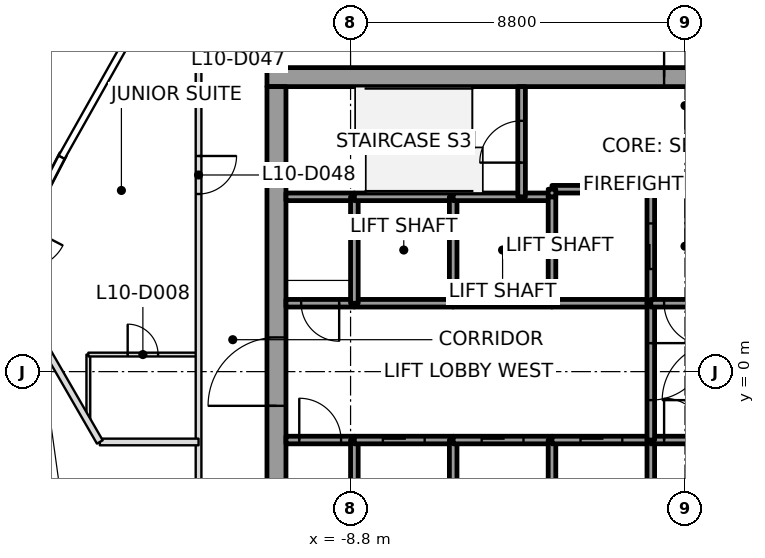
"""IFC4 building model, lengths in metres.
Left out: names, types, materials, properties, quantities, classifications, styles, units other than length and angle.
Written with IfcOpenShell. Run it as: python <this file> out.ifc"""

import sys

from ifc_helpers import new_model, si_unit, direction, frame, frame_2d, origin, place, context, subcontext, project, spatial, rectangle, extrude, element, fill, save


model = new_model("IFC4")
c1 = context("Model", 3, precision=1e-05, world=origin(), true_north=direction((0.0, 1.0)))
c2 = subcontext(c1, "Body", "Model", "MODEL_VIEW")
j1 = project(units=[si_unit("LENGTHUNIT", "METRE"), si_unit("PLANEANGLEUNIT", "RADIAN")], contexts=[c1])
p1 = place(None, origin())
s1 = spatial("IfcSite", under=j1, at=p1, CompositionType="ELEMENT")
p2 = place(p1, origin())
s2 = spatial("IfcBuilding", under=s1, at=p2, CompositionType="ELEMENT")
p3 = place(p2, frame((0.0, 0.0, 59.1)))
s3 = spatial("IfcBuildingStorey", under=s2, at=p3, CompositionType="ELEMENT", Elevation=59.1)
p4 = place(p3, frame((-11.0, 7.75, 0.0), z_axis=(0.0, 0.0, 1.0), x_axis=(1.0, 0.0, 0.0)))
e1 = element("IfcWall", 1, at=p4, inside=s3, PredefinedType="SHEAR", context=c2, shape_type="SweptSolid", body=[
    extrude(rectangle(XDim=22.0, YDim=0.5, at=frame_2d((11.0, 0.0))), origin(), (0.0, 0.0, 1.0), 3.7),
])
p5 = place(p4, frame((10.45, 0.0, 0.0)))
e2 = element("IfcOpeningElement", 2, at=p5, cuts=e1, PredefinedType="OPENING", context=c2, shape_type="SweptSolid", body=[
    extrude(rectangle(XDim=1.1, YDim=2.1, at=frame_2d((0.55, 1.05))), frame((0.0, 0.25, 0.0), z_axis=(0.0, -1.0, 0.0), x_axis=(1.0, 0.0, 0.0)), (0.0, 0.0, 1.0), 0.5),
])
p6 = place(p3, frame((-10.75, -7.5, 0.0), z_axis=(0.0, 0.0, 1.0), x_axis=(0.0, 1.0, 0.0)))
e3 = element("IfcWall", 3, at=p6, inside=s3, PredefinedType="SHEAR", context=c2, shape_type="SweptSolid", body=[
    extrude(rectangle(XDim=15.0, YDim=0.5, at=frame_2d((7.5, 0.0))), origin(), (0.0, 0.0, 1.0), 3.7),
])
p7 = place(p6, frame((6.6, 0.0, 0.0)))
e4 = element("IfcOpeningElement", 4, at=p7, cuts=e3, PredefinedType="OPENING", context=c2, shape_type="SweptSolid", body=[
    extrude(rectangle(XDim=1.8, YDim=2.1, at=frame_2d((0.9, 1.05))), frame((0.0, 0.25, 0.0), z_axis=(0.0, -1.0, 0.0), x_axis=(1.0, 0.0, 0.0)), (0.0, 0.0, 1.0), 0.5),
])
p8 = place(p3, frame((-16.363, 5.72, 0.0), z_axis=(0.0, 0.0, 1.0), x_axis=(-0.46026588587, -0.887781118466, 0.0)))
e5 = element("IfcWall", 5, at=p8, inside=s3, PredefinedType="SOLIDWALL", context=c2, shape_type="SweptSolid", body=[
    extrude(rectangle(XDim=5.837, YDim=0.2, at=frame_2d((2.918, 0.0))), origin(), (0.0, 0.0, 1.0), 3.017),
])
p9 = place(p8, frame((2.134, 0.0, 0.0)))
e6 = element("IfcOpeningElement", 6, at=p9, cuts=e5, PredefinedType="OPENING", context=c2, shape_type="SweptSolid", body=[
    extrude(rectangle(XDim=1.1, YDim=2.1, at=frame_2d((0.55, 1.05))), frame((0.0, 0.1, 0.0), z_axis=(0.0, -1.0, 0.0), x_axis=(1.0, 0.0, 0.0)), (0.0, 0.0, 1.0), 0.2),
])
p10 = place(p3, frame((-10.5, -1.8, 0.0), z_axis=(0.0, 0.0, 1.0), x_axis=(1.0, 0.0, 0.0)))
e7 = element("IfcWall", 7, at=p10, inside=s3, PredefinedType="SOLIDWALL", context=c2, shape_type="SweptSolid", body=[
    extrude(rectangle(XDim=1.8, YDim=0.2, at=frame_2d((0.9, 0.0))), origin(), (0.0, 0.0, 1.0), 3.55),
])
p11 = place(p10, frame((0.35, 0.0, 0.0)))
e8 = element("IfcOpeningElement", 8, at=p11, cuts=e7, PredefinedType="OPENING", context=c2, shape_type="SweptSolid", body=[
    extrude(rectangle(XDim=1.1, YDim=2.1, at=frame_2d((0.55, 1.05))), frame((0.0, 0.1, 0.0), z_axis=(0.0, -1.0, 0.0), x_axis=(1.0, 0.0, 0.0)), (0.0, 0.0, 1.0), 0.2),
])
p12 = place(p3, frame((-8.7, 1.8, 0.0), z_axis=(0.0, 0.0, 1.0), x_axis=(-1.0, 0.0, 0.0)))
e9 = element("IfcWall", 9, at=p12, inside=s3, PredefinedType="SOLIDWALL", context=c2, shape_type="SweptSolid", body=[
    extrude(rectangle(XDim=1.8, YDim=0.2, at=frame_2d((0.9, 0.0))), origin(), (0.0, 0.0, 1.0), 3.55),
])
p13 = place(p12, frame((0.4, 0.0, 0.0)))
e10 = element("IfcOpeningElement", 10, at=p13, cuts=e9, PredefinedType="OPENING", context=c2, shape_type="SweptSolid", body=[
    extrude(rectangle(XDim=1.0, YDim=2.1, at=frame_2d((0.5, 1.05))), frame((0.0, 0.1, 0.0), z_axis=(0.0, -1.0, 0.0), x_axis=(1.0, 0.0, 0.0)), (0.0, 0.0, 1.0), 0.2),
])
p14 = place(p3, frame((-8.7, 4.6, 0.0), z_axis=(0.0, 0.0, 1.0), x_axis=(-1.0, 0.0, 0.0)))
e11 = element("IfcWall", 11, at=p14, inside=s3, PredefinedType="SOLIDWALL", context=c2, shape_type="SweptSolid", body=[
    extrude(rectangle(XDim=1.8, YDim=0.2, at=frame_2d((0.9, 0.0))), origin(), (0.0, 0.0, 1.0), 3.55),
])
p15 = place(p3, frame((-8.7, -4.6, 0.0), z_axis=(0.0, 0.0, 1.0), x_axis=(0.0, 1.0, 0.0)))
e12 = element("IfcWall", 12, at=p15, inside=s3, PredefinedType="SOLIDWALL", context=c2, shape_type="SweptSolid", body=[
    extrude(rectangle(XDim=2.8, YDim=0.2, at=frame_2d((1.4, 0.0))), origin(), (0.0, 0.0, 1.0), 3.55),
])
p16 = place(p3, frame((-8.7, -1.8, 0.0), z_axis=(0.0, 0.0, 1.0), x_axis=(1.0, 0.0, 0.0)))
e13 = element("IfcWall", 13, at=p16, inside=s3, PredefinedType="SOLIDWALL", context=c2, shape_type="SweptSolid", body=[
    extrude(rectangle(XDim=2.6, YDim=0.2, at=frame_2d((1.3, 0.0))), origin(), (0.0, 0.0, 1.0), 3.55),
])
p17 = place(p16, frame((0.75, 0.0, 0.0)))
e14 = element("IfcOpeningElement", 14, at=p17, cuts=e13, PredefinedType="OPENING", context=c2, shape_type="SweptSolid", body=[
    extrude(rectangle(XDim=1.1, YDim=2.1, at=frame_2d((0.55, 1.05))), frame((0.0, 0.1, 0.0), z_axis=(0.0, -1.0, 0.0), x_axis=(1.0, 0.0, 0.0)), (0.0, 0.0, 1.0), 0.2),
])
p18 = place(p3, frame((-6.1, 1.8, 0.0), z_axis=(0.0, 0.0, 1.0), x_axis=(-1.0, 0.0, 0.0)))
e15 = element("IfcWall", 15, at=p18, inside=s3, PredefinedType="SOLIDWALL", context=c2, shape_type="SweptSolid", body=[
    extrude(rectangle(XDim=2.6, YDim=0.2, at=frame_2d((1.3, 0.0))), origin(), (0.0, 0.0, 1.0), 3.55),
])
p19 = place(p3, frame((-8.7, 1.8, 0.0), z_axis=(0.0, 0.0, 1.0), x_axis=(0.0, 1.0, 0.0)))
e16 = element("IfcWall", 16, at=p19, inside=s3, PredefinedType="SOLIDWALL", context=c2, shape_type="SweptSolid", body=[
    extrude(rectangle(XDim=2.8, YDim=0.2, at=frame_2d((1.4, 0.0))), origin(), (0.0, 0.0, 1.0), 3.55),
])
p20 = place(p3, frame((-6.1, 4.6, 0.0), z_axis=(0.0, 0.0, 1.0), x_axis=(-1.0, 0.0, 0.0)))
e17 = element("IfcWall", 17, at=p20, inside=s3, PredefinedType="SOLIDWALL", context=c2, shape_type="SweptSolid", body=[
    extrude(rectangle(XDim=2.6, YDim=0.2, at=frame_2d((1.3, 0.0))), origin(), (0.0, 0.0, 1.0), 3.55),
])
p21 = place(p3, frame((-6.1, -4.6, 0.0), z_axis=(0.0, 0.0, 1.0), x_axis=(0.0, 1.0, 0.0)))
e18 = element("IfcWall", 18, at=p21, inside=s3, PredefinedType="SOLIDWALL", context=c2, shape_type="SweptSolid", body=[
    extrude(rectangle(XDim=2.8, YDim=0.2, at=frame_2d((1.4, 0.0))), origin(), (0.0, 0.0, 1.0), 3.55),
])
p22 = place(p3, frame((-6.1, -1.8, 0.0), z_axis=(0.0, 0.0, 1.0), x_axis=(1.0, 0.0, 0.0)))
e19 = element("IfcWall", 19, at=p22, inside=s3, PredefinedType="SOLIDWALL", context=c2, shape_type="SweptSolid", body=[
    extrude(rectangle(XDim=2.6, YDim=0.2, at=frame_2d((1.3, 0.0))), origin(), (0.0, 0.0, 1.0), 3.55),
])
p23 = place(p22, frame((0.75, 0.0, 0.0)))
e20 = element("IfcOpeningElement", 20, at=p23, cuts=e19, PredefinedType="OPENING", context=c2, shape_type="SweptSolid", body=[
    extrude(rectangle(XDim=1.1, YDim=2.1, at=frame_2d((0.55, 1.05))), frame((0.0, 0.1, 0.0), z_axis=(0.0, -1.0, 0.0), x_axis=(1.0, 0.0, 0.0)), (0.0, 0.0, 1.0), 0.2),
])
p24 = place(p3, frame((-3.5, 1.8, 0.0), z_axis=(0.0, 0.0, 1.0), x_axis=(-1.0, 0.0, 0.0)))
e21 = element("IfcWall", 21, at=p24, inside=s3, PredefinedType="SOLIDWALL", context=c2, shape_type="SweptSolid", body=[
    extrude(rectangle(XDim=2.6, YDim=0.2, at=frame_2d((1.3, 0.0))), origin(), (0.0, 0.0, 1.0), 3.55),
])
p25 = place(p3, frame((-6.1, 1.8, 0.0), z_axis=(0.0, 0.0, 1.0), x_axis=(0.0, 1.0, 0.0)))
e22 = element("IfcWall", 22, at=p25, inside=s3, PredefinedType="SOLIDWALL", context=c2, shape_type="SweptSolid", body=[
    extrude(rectangle(XDim=2.8, YDim=0.2, at=frame_2d((1.4, 0.0))), origin(), (0.0, 0.0, 1.0), 3.55),
])
p26 = place(p3, frame((-4.3, 4.6, 0.0), z_axis=(0.0, 0.0, 1.0), x_axis=(-1.0, 0.0, 0.0)))
e23 = element("IfcWall", 23, at=p26, inside=s3, PredefinedType="SOLIDWALL", context=c2, shape_type="SweptSolid", body=[
    extrude(rectangle(XDim=1.8, YDim=0.2, at=frame_2d((0.9, 0.0))), origin(), (0.0, 0.0, 1.0), 3.55),
])
p27 = place(p3, frame((-3.5, 4.6, 0.0), z_axis=(0.0, 0.0, 1.0), x_axis=(-1.0, 0.0, 0.0)))
e24 = element("IfcWall", 24, at=p27, inside=s3, PredefinedType="SOLIDWALL", context=c2, shape_type="SweptSolid", body=[
    extrude(rectangle(XDim=0.8, YDim=0.2, at=frame_2d((0.4, 0.0))), origin(), (0.0, 0.0, 1.0), 3.55),
])
p28 = place(p3, frame((-4.3, 4.6, 0.0), z_axis=(0.0, 0.0, 1.0), x_axis=(0.0, 1.0, 0.0)))
e25 = element("IfcWall", 25, at=p28, inside=s3, PredefinedType="SOLIDWALL", context=c2, shape_type="SweptSolid", body=[
    extrude(rectangle(XDim=2.9, YDim=0.2, at=frame_2d((1.45, 0.0))), origin(), (0.0, 0.0, 1.0), 3.55),
])
p29 = place(p28, frame((0.9, 0.0, 0.0)))
e26 = element("IfcOpeningElement", 26, at=p29, cuts=e25, PredefinedType="OPENING", context=c2, shape_type="SweptSolid", body=[
    extrude(rectangle(XDim=1.1, YDim=2.1, at=frame_2d((0.55, 1.05))), frame((0.0, 0.1, 0.0), z_axis=(0.0, -1.0, 0.0), x_axis=(1.0, 0.0, 0.0)), (0.0, 0.0, 1.0), 0.2),
])
p30 = place(p3, frame((-3.5, -4.6, 0.0), z_axis=(0.0, 0.0, 1.0), x_axis=(0.0, 1.0, 0.0)))
e27 = element("IfcWall", 27, at=p30, inside=s3, PredefinedType="SOLIDWALL", context=c2, shape_type="SweptSolid", body=[
    extrude(rectangle(XDim=2.8, YDim=0.2, at=frame_2d((1.4, 0.0))), origin(), (0.0, 0.0, 1.0), 3.55),
])
p31 = place(p3, frame((-3.5, -1.8, 0.0), z_axis=(0.0, 0.0, 1.0), x_axis=(1.0, 0.0, 0.0)))
e28 = element("IfcWall", 28, at=p31, inside=s3, PredefinedType="SOLIDWALL", context=c2, shape_type="SweptSolid", body=[
    extrude(rectangle(XDim=2.6, YDim=0.2, at=frame_2d((1.3, 0.0))), origin(), (0.0, 0.0, 1.0), 3.55),
])
p32 = place(p31, frame((0.75, 0.0, 0.0)))
e29 = element("IfcOpeningElement", 29, at=p32, cuts=e28, PredefinedType="OPENING", context=c2, shape_type="SweptSolid", body=[
    extrude(rectangle(XDim=1.1, YDim=2.1, at=frame_2d((0.55, 1.05))), frame((0.0, 0.1, 0.0), z_axis=(0.0, -1.0, 0.0), x_axis=(1.0, 0.0, 0.0)), (0.0, 0.0, 1.0), 0.2),
])
p33 = place(p3, frame((-0.9, 1.8, 0.0), z_axis=(0.0, 0.0, 1.0), x_axis=(-1.0, 0.0, 0.0)))
e30 = element("IfcWall", 30, at=p33, inside=s3, PredefinedType="SOLIDWALL", context=c2, shape_type="SweptSolid", body=[
    extrude(rectangle(XDim=2.6, YDim=0.2, at=frame_2d((1.3, 0.0))), origin(), (0.0, 0.0, 1.0), 3.55),
])
p34 = place(p3, frame((-3.5, 4.6, 0.0), z_axis=(0.0, 0.0, 1.0), x_axis=(0.0, -1.0, 0.0)))
e31 = element("IfcWall", 31, at=p34, inside=s3, PredefinedType="SOLIDWALL", context=c2, shape_type="SweptSolid", body=[
    extrude(rectangle(XDim=2.8, YDim=0.2, at=frame_2d((1.4, 0.0))), origin(), (0.0, 0.0, 1.0), 3.55),
])
p35 = place(p3, frame((-0.9, 1.8, 0.0), z_axis=(0.0, 0.0, 1.0), x_axis=(0.0, 1.0, 0.0)))
e32 = element("IfcWall", 32, at=p35, inside=s3, PredefinedType="SOLIDWALL", context=c2, shape_type="SweptSolid", body=[
    extrude(rectangle(XDim=3.0, YDim=0.2, at=frame_2d((1.5, 0.0))), origin(), (0.0, 0.0, 1.0), 3.55),
])
p36 = place(p35, frame((0.9, 0.0, 0.0)))
e33 = element("IfcOpeningElement", 33, at=p36, cuts=e32, PredefinedType="OPENING", context=c2, shape_type="SweptSolid", body=[
    extrude(rectangle(XDim=1.2, YDim=2.1, at=frame_2d((0.6, 1.05))), frame((0.0, 0.1, 0.0), z_axis=(0.0, -1.0, 0.0), x_axis=(1.0, 0.0, 0.0)), (0.0, 0.0, 1.0), 0.2),
])
p37 = place(p3, frame((-0.9, 4.8, 0.0), z_axis=(0.0, 0.0, 1.0), x_axis=(-1.0, 0.0, 0.0)))
e34 = element("IfcWall", 34, at=p37, inside=s3, PredefinedType="SOLIDWALL", context=c2, shape_type="SweptSolid", body=[
    extrude(rectangle(XDim=2.6, YDim=0.2, at=frame_2d((1.3, 0.0))), origin(), (0.0, 0.0, 1.0), 3.55),
])
p38 = place(p3, frame((-3.5, 4.8, 0.0), z_axis=(0.0, 0.0, 1.0), x_axis=(0.0, -1.0, 0.0)))
e35 = element("IfcWall", 35, at=p38, inside=s3, PredefinedType="SOLIDWALL", context=c2, shape_type="SweptSolid", body=[
    extrude(rectangle(XDim=0.2, YDim=0.2, at=frame_2d((0.1, 0.0))), origin(), (0.0, 0.0, 1.0), 3.55),
])
p39 = place(p3, frame((-0.9, -4.6, 0.0), z_axis=(0.0, 0.0, 1.0), x_axis=(0.0, 1.0, 0.0)))
e36 = element("IfcWall", 36, at=p39, inside=s3, PredefinedType="SOLIDWALL", context=c2, shape_type="SweptSolid", body=[
    extrude(rectangle(XDim=2.8, YDim=0.2, at=frame_2d((1.4, 0.0))), origin(), (0.0, 0.0, 1.0), 3.55),
])
p40 = place(p3, frame((-0.9, -1.8, 0.0), z_axis=(0.0, 0.0, 1.0), x_axis=(1.0, 0.0, 0.0)))
e37 = element("IfcWall", 37, at=p40, inside=s3, PredefinedType="SOLIDWALL", context=c2, shape_type="SweptSolid", body=[
    extrude(rectangle(XDim=1.8, YDim=0.2, at=frame_2d((0.9, 0.0))), origin(), (0.0, 0.0, 1.0), 3.55),
])
p41 = place(p40, frame((0.35, 0.0, 0.0)))
e38 = element("IfcOpeningElement", 38, at=p41, cuts=e37, PredefinedType="OPENING", context=c2, shape_type="SweptSolid", body=[
    extrude(rectangle(XDim=1.1, YDim=2.1, at=frame_2d((0.55, 1.05))), frame((0.0, 0.1, 0.0), z_axis=(0.0, -1.0, 0.0), x_axis=(1.0, 0.0, 0.0)), (0.0, 0.0, 1.0), 0.2),
])
p42 = place(p3, frame((-0.9, 1.8, 0.0), z_axis=(0.0, 0.0, 1.0), x_axis=(0.0, -1.0, 0.0)))
e39 = element("IfcWall", 39, at=p42, inside=s3, PredefinedType="SOLIDWALL", context=c2, shape_type="SweptSolid", body=[
    extrude(rectangle(XDim=3.6, YDim=0.2, at=frame_2d((1.8, 0.0))), origin(), (0.0, 0.0, 1.0), 3.55),
])
p43 = place(p42, frame((1.05, 0.0, 0.0)))
e40 = element("IfcOpeningElement", 40, at=p43, cuts=e39, PredefinedType="OPENING", context=c2, shape_type="SweptSolid", body=[
    extrude(rectangle(XDim=1.5, YDim=2.1, at=frame_2d((0.75, 1.05))), frame((0.0, 0.1, 0.0), z_axis=(0.0, -1.0, 0.0), x_axis=(1.0, 0.0, 0.0)), (0.0, 0.0, 1.0), 0.2),
])
p44 = place(p3, frame((0.9, 1.8, 0.0), z_axis=(0.0, 0.0, 1.0), x_axis=(-1.0, 0.0, 0.0)))
e41 = element("IfcWall", 41, at=p44, inside=s3, PredefinedType="SOLIDWALL", context=c2, shape_type="SweptSolid", body=[
    extrude(rectangle(XDim=1.8, YDim=0.2, at=frame_2d((0.9, 0.0))), origin(), (0.0, 0.0, 1.0), 3.55),
])
p45 = place(p44, frame((0.35, 0.0, 0.0)))
e42 = element("IfcOpeningElement", 42, at=p45, cuts=e41, PredefinedType="OPENING", context=c2, shape_type="SweptSolid", body=[
    extrude(rectangle(XDim=1.1, YDim=2.1, at=frame_2d((0.55, 1.05))), frame((0.0, 0.1, 0.0), z_axis=(0.0, -1.0, 0.0), x_axis=(1.0, 0.0, 0.0)), (0.0, 0.0, 1.0), 0.2),
])
p46 = place(p3, frame((-12.8, -1.851, 0.0), z_axis=(0.0, 0.0, 1.0), x_axis=(-1.0, 0.0, 0.0)))
e43 = element("IfcWall", 43, at=p46, inside=s3, PredefinedType="PARTITIONING", context=c2, shape_type="SweptSolid", body=[
    extrude(rectangle(XDim=2.598, YDim=0.175, at=frame_2d((1.299, 0.0))), origin(), (0.0, 0.0, 1.0), 3.15),
])
p47 = place(p3, frame((-15.398, -1.851, 0.0), z_axis=(0.0, 0.0, 1.0), x_axis=(-0.500028719662, 0.866008821845, 0.0)))
e44 = element("IfcWall", 44, at=p47, inside=s3, PredefinedType="PARTITIONING", context=c2, shape_type="SweptSolid", body=[
    extrude(rectangle(XDim=5.083, YDim=0.175, at=frame_2d((2.542, 0.0))), origin(), (0.0, 0.0, 1.0), 3.15),
])
p48 = place(p3, frame((-12.8, 9.72, 0.0), z_axis=(0.0, 0.0, 1.0), x_axis=(0.0, -1.0, 0.0)))
e45 = element("IfcWall", 45, at=p48, inside=s3, PredefinedType="PARTITIONING", context=c2, shape_type="SweptSolid", body=[
    extrude(rectangle(XDim=16.071, YDim=0.15, at=frame_2d((8.035, 0.0))), origin(), (0.0, 0.0, 1.0), 3.017),
])
p49 = place(p48, frame((4.045, 0.0, 0.0)))
e46 = element("IfcOpeningElement", 46, at=p49, cuts=e45, PredefinedType="OPENING", context=c2, shape_type="SweptSolid", body=[
    extrude(rectangle(XDim=1.0, YDim=2.1, at=frame_2d((0.5, 1.05))), frame((0.0, 0.075, 0.0), z_axis=(0.0, -1.0, 0.0), x_axis=(1.0, 0.0, 0.0)), (0.0, 0.0, 1.0), 0.15),
])
p50 = place(p3, frame((-15.7, -1.268, 0.0), z_axis=(0.0, 0.0, 1.0), x_axis=(0.0, 1.0, 0.0)))
e47 = element("IfcWall", 47, at=p50, inside=s3, PredefinedType="PARTITIONING", context=c2, shape_type="SweptSolid", body=[
    extrude(rectangle(XDim=1.717, YDim=0.1, at=frame_2d((0.858, 0.0))), origin(), (0.0, 0.0, 1.0), 3.15),
])
p51 = place(p3, frame((-15.7, 0.449, 0.0), z_axis=(0.0, 0.0, 1.0), x_axis=(1.0, 0.0, 0.0)))
e48 = element("IfcWall", 48, at=p51, inside=s3, PredefinedType="PARTITIONING", context=c2, shape_type="SweptSolid", body=[
    extrude(rectangle(XDim=2.87, YDim=0.1, at=frame_2d((1.435, 0.0))), origin(), (0.0, 0.0, 1.0), 3.017),
])
p52 = place(p51, frame((1.035, 0.0, 0.0)))
e49 = element("IfcOpeningElement", 49, at=p52, cuts=e48, PredefinedType="OPENING", context=c2, shape_type="SweptSolid", body=[
    extrude(rectangle(XDim=0.8, YDim=2.1, at=frame_2d((0.4, 1.05))), frame((0.0, 0.05, 0.0), z_axis=(0.0, -1.0, 0.0), x_axis=(1.0, 0.0, 0.0)), (0.0, 0.0, 1.0), 0.1),
])
p53 = place(p49, origin())
e50 = element("IfcDoor", 50, at=p53, inside=s3, OperationType="SINGLE_SWING_RIGHT", PredefinedType="DOOR", context=c2, shape_type="SweptSolid", body=[
    extrude(rectangle(XDim=1.0, YDim=2.1, at=frame_2d((0.5, 1.05))), frame((0.0, 0.025, 0.0), z_axis=(0.0, -1.0, 0.0), x_axis=(1.0, 0.0, 0.0)), (0.0, 0.0, 1.0), 0.05),
])
fill(e46, e50)
p54 = place(p52, origin())
e51 = element("IfcDoor", 51, at=p54, inside=s3, OperationType="SINGLE_SWING_LEFT", PredefinedType="DOOR", context=c2, shape_type="SweptSolid", body=[
    extrude(rectangle(XDim=0.8, YDim=2.1, at=frame_2d((0.4, 1.05))), frame((0.0, 0.025, 0.0), z_axis=(0.0, -1.0, 0.0), x_axis=(1.0, 0.0, 0.0)), (0.0, 0.0, 1.0), 0.05),
])
fill(e49, e51)
p55 = place(p17, origin())
e52 = element("IfcDoor", 52, at=p55, inside=s3, OperationType="SLIDING_TO_LEFT", PredefinedType="DOOR", context=c2, shape_type="SweptSolid", body=[
    extrude(rectangle(XDim=1.1, YDim=2.1, at=frame_2d((0.55, 1.05))), frame((0.0, 0.025, 0.0), z_axis=(0.0, -1.0, 0.0), x_axis=(1.0, 0.0, 0.0)), (0.0, 0.0, 1.0), 0.05),
])
fill(e14, e52)
p56 = place(p23, origin())
e53 = element("IfcDoor", 53, at=p56, inside=s3, OperationType="SLIDING_TO_RIGHT", PredefinedType="DOOR", context=c2, shape_type="SweptSolid", body=[
    extrude(rectangle(XDim=1.1, YDim=2.1, at=frame_2d((0.55, 1.05))), frame((0.0, 0.025, 0.0), z_axis=(0.0, -1.0, 0.0), x_axis=(1.0, 0.0, 0.0)), (0.0, 0.0, 1.0), 0.05),
])
fill(e20, e53)
p57 = place(p32, origin())
e54 = element("IfcDoor", 54, at=p57, inside=s3, OperationType="SLIDING_TO_RIGHT", PredefinedType="DOOR", context=c2, shape_type="SweptSolid", body=[
    extrude(rectangle(XDim=1.1, YDim=2.1, at=frame_2d((0.55, 1.05))), frame((0.0, 0.025, 0.0), z_axis=(0.0, -1.0, 0.0), x_axis=(1.0, 0.0, 0.0)), (0.0, 0.0, 1.0), 0.05),
])
fill(e29, e54)
p58 = place(p36, origin())
e55 = element("IfcDoor", 55, at=p58, inside=s3, OperationType="SLIDING_TO_RIGHT", PredefinedType="DOOR", context=c2, shape_type="SweptSolid", body=[
    extrude(rectangle(XDim=1.2, YDim=2.1, at=frame_2d((0.6, 1.05))), frame((0.0, 0.025, 0.0), z_axis=(0.0, -1.0, 0.0), x_axis=(1.0, 0.0, 0.0)), (0.0, 0.0, 1.0), 0.05),
])
fill(e33, e55)
p59 = place(p43, origin())
e56 = element("IfcDoor", 56, at=p59, inside=s3, OperationType="DOUBLE_DOOR_SINGLE_SWING", PredefinedType="DOOR", context=c2, shape_type="SweptSolid", body=[
    extrude(rectangle(XDim=1.5, YDim=2.1, at=frame_2d((0.75, 1.05))), frame((0.0, 0.025, 0.0), z_axis=(0.0, -1.0, 0.0), x_axis=(1.0, 0.0, 0.0)), (0.0, 0.0, 1.0), 0.05),
])
fill(e40, e56)
p60 = place(p11, origin())
e57 = element("IfcDoor", 57, at=p60, inside=s3, OperationType="SINGLE_SWING_LEFT", PredefinedType="DOOR", context=c2, shape_type="SweptSolid", body=[
    extrude(rectangle(XDim=1.1, YDim=2.1, at=frame_2d((0.55, 1.05))), frame((0.0, 0.025, 0.0), z_axis=(0.0, -1.0, 0.0), x_axis=(1.0, 0.0, 0.0)), (0.0, 0.0, 1.0), 0.05),
])
fill(e8, e57)
p61 = place(p45, origin())
e58 = element("IfcDoor", 58, at=p61, inside=s3, OperationType="SINGLE_SWING_RIGHT", PredefinedType="DOOR", context=c2, shape_type="SweptSolid", body=[
    extrude(rectangle(XDim=1.1, YDim=2.1, at=frame_2d((0.55, 1.05))), frame((0.0, 0.025, 0.0), z_axis=(0.0, -1.0, 0.0), x_axis=(1.0, 0.0, 0.0)), (0.0, 0.0, 1.0), 0.05),
])
fill(e42, e58)
p62 = place(p41, origin())
e59 = element("IfcDoor", 59, at=p62, inside=s3, OperationType="SINGLE_SWING_LEFT", PredefinedType="DOOR", context=c2, shape_type="SweptSolid", body=[
    extrude(rectangle(XDim=1.1, YDim=2.1, at=frame_2d((0.55, 1.05))), frame((0.0, 0.025, 0.0), z_axis=(0.0, -1.0, 0.0), x_axis=(1.0, 0.0, 0.0)), (0.0, 0.0, 1.0), 0.05),
])
fill(e38, e59)
p63 = place(p13, origin())
e60 = element("IfcDoor", 60, at=p63, inside=s3, OperationType="SINGLE_SWING_RIGHT", PredefinedType="DOOR", context=c2, shape_type="SweptSolid", body=[
    extrude(rectangle(XDim=1.0, YDim=2.1, at=frame_2d((0.5, 1.05))), frame((0.0, 0.025, 0.0), z_axis=(0.0, -1.0, 0.0), x_axis=(1.0, 0.0, 0.0)), (0.0, 0.0, 1.0), 0.05),
])
fill(e10, e60)
p64 = place(p29, origin())
e61 = element("IfcDoor", 61, at=p64, inside=s3, OperationType="SINGLE_SWING_RIGHT", PredefinedType="DOOR", context=c2, shape_type="SweptSolid", body=[
    extrude(rectangle(XDim=1.1, YDim=2.1, at=frame_2d((0.55, 1.05))), frame((0.0, 0.025, 0.0), z_axis=(0.0, -1.0, 0.0), x_axis=(1.0, 0.0, 0.0)), (0.0, 0.0, 1.0), 0.05),
])
fill(e26, e61)
p65 = place(p7, origin())
e62 = element("IfcDoor", 62, at=p65, inside=s3, OperationType="DOUBLE_DOOR_SINGLE_SWING", PredefinedType="DOOR", context=c2, shape_type="SweptSolid", body=[
    extrude(rectangle(XDim=1.8, YDim=2.1, at=frame_2d((0.9, 1.05))), frame((0.0, 0.025, 0.0), z_axis=(0.0, -1.0, 0.0), x_axis=(1.0, 0.0, 0.0)), (0.0, 0.0, 1.0), 0.05),
])
fill(e4, e62)
p66 = place(p5, origin())
e63 = element("IfcDoor", 63, at=p66, inside=s3, OperationType="SINGLE_SWING_LEFT", PredefinedType="DOOR", context=c2, shape_type="SweptSolid", body=[
    extrude(rectangle(XDim=1.1, YDim=2.1, at=frame_2d((0.55, 1.05))), frame((0.0, 0.025, 0.0), z_axis=(0.0, -1.0, 0.0), x_axis=(1.0, 0.0, 0.0)), (0.0, 0.0, 1.0), 0.05),
])
fill(e2, e63)
save(model, sys.argv[1])
